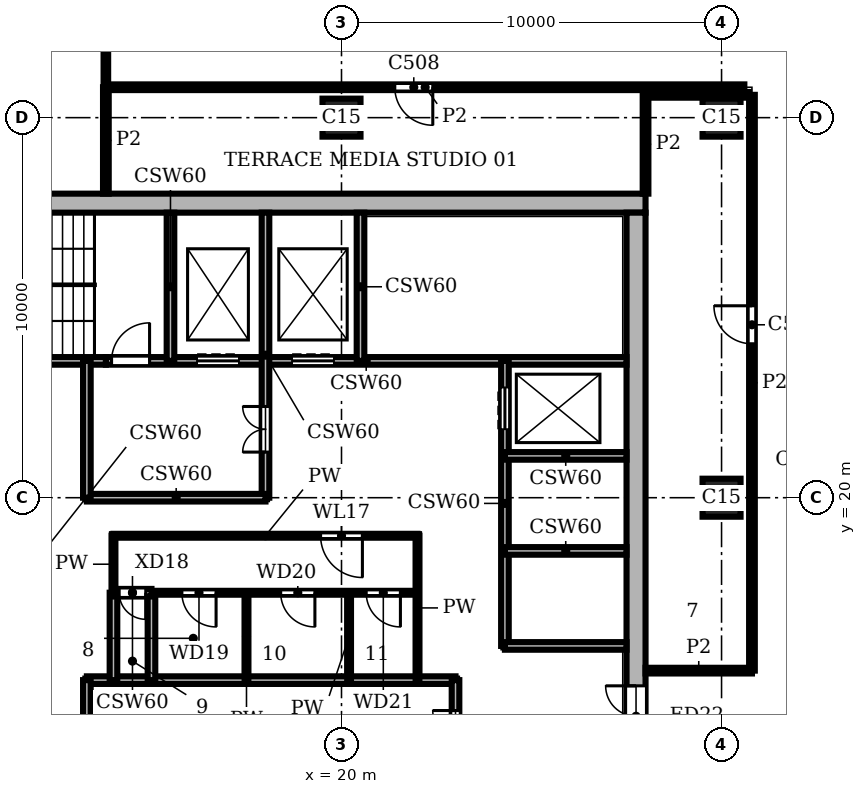
"""IFC4 building model, lengths in metres.
Left out: names, types, materials, properties, quantities, classifications, styles, units other than length and angle.
Written with IfcOpenShell. Run it as: python <this file> out.ifc"""

import sys

from ifc_helpers import new_model, si_unit, direction, frame, frame_2d, origin, origin_2d, place, context, subcontext, project, spatial, rectangle, extrude, element, fill, save


model = new_model("IFC4")
c1 = context("Model", 3, precision=1e-05, world=origin(), true_north=direction((0.0, 1.0)))
c2 = subcontext(c1, "Body", "Model", "MODEL_VIEW")
j1 = project(units=[si_unit("LENGTHUNIT", "METRE"), si_unit("PLANEANGLEUNIT", "RADIAN")], contexts=[c1])
p1 = place(None, origin())
s1 = spatial("IfcSite", under=j1, at=p1, CompositionType="ELEMENT")
p2 = place(p1, origin())
s2 = spatial("IfcBuilding", under=s1, at=p2, CompositionType="ELEMENT")
p3 = place(p2, frame((0.0, 0.0, 290.4)))
s3 = spatial("IfcBuildingStorey", under=s2, at=p3, CompositionType="ELEMENT", Elevation=290.4)
for number, where, z_axis, x_axis in (
    (1, (20.0, 30.0, 0.0), (0.0, 0.0, 1.0), (1.0, 0.0, 0.0)),
    (2, (30.0, 20.0, 0.0), (0.0, 0.0, 1.0), (1.0, 0.0, 0.0)),
    (3, (30.0, 30.0, 0.0), (0.0, 0.0, 1.0), (1.0, 0.0, 0.0)),
):
    element("IfcColumn", number, at=place(p3, frame(where, z_axis=z_axis, x_axis=x_axis)), inside=s3, PredefinedType="COLUMN", context=c2, shape_type="SweptSolid", body=[
        extrude(rectangle(XDim=1.0, YDim=1.0, at=origin_2d()), origin(), (0.0, 0.0, 1.0), 3.9),
    ])
p4 = place(p3, frame((27.75, 8.5, 0.0), z_axis=(0.0, 0.0, 1.0), x_axis=(0.0, 1.0, 0.0)))
e4 = element("IfcWall", 4, at=p4, inside=s3, PredefinedType="SHEAR", context=c2, shape_type="SweptSolid", body=[
    extrude(rectangle(XDim=19.0, YDim=0.5, at=frame_2d((9.5, 0.0))), origin(), (0.0, 0.0, 1.0), 3.9),
])
p5 = place(p4, frame((4.95, 0.0, 0.0)))
e5 = element("IfcOpeningElement", 5, at=p5, cuts=e4, PredefinedType="OPENING", context=c2, shape_type="SweptSolid", body=[
    extrude(rectangle(XDim=1.6, YDim=2.1, at=frame_2d((0.8, 1.05))), frame((0.0, 0.26, 0.0), z_axis=(0.0, -1.0, 0.0), x_axis=(1.0, 0.0, 0.0)), (0.0, 0.0, 1.0), 0.52),
])
p6 = place(p3, frame((28.0, 27.75, 0.0), z_axis=(0.0, 0.0, 1.0), x_axis=(-1.0, 0.0, 0.0)))
e6 = element("IfcWall", 6, at=p6, inside=s3, PredefinedType="SHEAR", context=c2, shape_type="SweptSolid", body=[
    extrude(rectangle(XDim=20.0, YDim=0.5, at=frame_2d((10.0, 0.0))), origin(), (0.0, 0.0, 1.0), 3.9),
])
p7 = place(p3, frame((13.3, 15.2, 0.0), z_axis=(0.0, 0.0, 1.0), x_axis=(1.0, 0.0, 0.0)))
e7 = element("IfcWall", 7, at=p7, inside=s3, PredefinedType="SHEAR", context=c2, shape_type="SweptSolid", body=[
    extrude(rectangle(XDim=9.7, YDim=0.2, at=frame_2d((4.85, 0.0))), origin(), (0.0, 0.0, 1.0), 3.58),
])
p8 = place(p3, frame((24.3, 16.1, 0.0), z_axis=(0.0, 0.0, 1.0), x_axis=(1.0, 0.0, 0.0)))
e8 = element("IfcWall", 8, at=p8, inside=s3, PredefinedType="SHEAR", context=c2, shape_type="SweptSolid", body=[
    extrude(rectangle(XDim=3.2, YDim=0.2, at=frame_2d((1.6, 0.0))), origin(), (0.0, 0.0, 1.0), 3.58),
])
p9 = place(p3, frame((15.0, 17.5, 0.0), z_axis=(0.0, 0.0, 1.0), x_axis=(1.0, 0.0, 0.0)))
e9 = element("IfcWall", 9, at=p9, inside=s3, PredefinedType="PARTITIONING", context=c2, shape_type="SweptSolid", body=[
    extrude(rectangle(XDim=7.0, YDim=0.1, at=frame_2d((3.5, 0.0))), origin(), (0.0, 0.0, 1.0), 3.58),
])
p10 = place(p9, frame((0.8, 0.0, 0.0)))
e10 = element("IfcOpeningElement", 10, at=p10, cuts=e9, PredefinedType="OPENING", context=c2, shape_type="SweptSolid", body=[
    extrude(rectangle(XDim=0.9, YDim=2.1, at=frame_2d((0.45, 1.05))), frame((0.0, 0.06, 0.0), z_axis=(0.0, -1.0, 0.0), x_axis=(1.0, 0.0, 0.0)), (0.0, 0.0, 1.0), 0.12),
])
p11 = place(p9, frame((3.4, 0.0, 0.0)))
e11 = element("IfcOpeningElement", 11, at=p11, cuts=e9, PredefinedType="OPENING", context=c2, shape_type="SweptSolid", body=[
    extrude(rectangle(XDim=0.9, YDim=2.1, at=frame_2d((0.45, 1.05))), frame((0.0, 0.06, 0.0), z_axis=(0.0, -1.0, 0.0), x_axis=(1.0, 0.0, 0.0)), (0.0, 0.0, 1.0), 0.12),
])
p12 = place(p9, frame((5.65, 0.0, 0.0)))
e12 = element("IfcOpeningElement", 12, at=p12, cuts=e9, PredefinedType="OPENING", context=c2, shape_type="SweptSolid", body=[
    extrude(rectangle(XDim=0.9, YDim=2.1, at=frame_2d((0.45, 1.05))), frame((0.0, 0.06, 0.0), z_axis=(0.0, -1.0, 0.0), x_axis=(1.0, 0.0, 0.0)), (0.0, 0.0, 1.0), 0.12),
])
p13 = place(p3, frame((14.0, 17.5, 0.0), z_axis=(0.0, 0.0, 1.0), x_axis=(1.0, 0.0, 0.0)))
e13 = element("IfcWall", 13, at=p13, inside=s3, PredefinedType="SHEAR", context=c2, shape_type="SweptSolid", body=[
    extrude(rectangle(XDim=1.0, YDim=0.2, at=frame_2d((0.5, 0.0))), origin(), (0.0, 0.0, 1.0), 3.58),
])
p14 = place(p13, frame((0.15, 0.0, 0.0)))
e14 = element("IfcOpeningElement", 14, at=p14, cuts=e13, PredefinedType="OPENING", context=c2, shape_type="SweptSolid", body=[
    extrude(rectangle(XDim=0.7, YDim=2.1, at=frame_2d((0.35, 1.05))), frame((0.0, 0.11, 0.0), z_axis=(0.0, -1.0, 0.0), x_axis=(1.0, 0.0, 0.0)), (0.0, 0.0, 1.0), 0.22),
])
p15 = place(p3, frame((24.3, 18.6, 0.0), z_axis=(0.0, 0.0, 1.0), x_axis=(1.0, 0.0, 0.0)))
e15 = element("IfcWall", 15, at=p15, inside=s3, PredefinedType="SHEAR", context=c2, shape_type="SweptSolid", body=[
    extrude(rectangle(XDim=3.2, YDim=0.2, at=frame_2d((1.6, 0.0))), origin(), (0.0, 0.0, 1.0), 3.58),
])
p16 = place(p3, frame((14.0, 19.0, 0.0), z_axis=(0.0, 0.0, 1.0), x_axis=(1.0, 0.0, 0.0)))
e16 = element("IfcWall", 16, at=p16, inside=s3, PredefinedType="PARTITIONING", context=c2, shape_type="SweptSolid", body=[
    extrude(rectangle(XDim=8.0, YDim=0.1, at=frame_2d((4.0, 0.0))), origin(), (0.0, 0.0, 1.0), 3.58),
])
p17 = place(p16, frame((5.45, 0.0, 0.0)))
e17 = element("IfcOpeningElement", 17, at=p17, cuts=e16, PredefinedType="OPENING", context=c2, shape_type="SweptSolid", body=[
    extrude(rectangle(XDim=1.1, YDim=2.1, at=frame_2d((0.55, 1.05))), frame((0.0, 0.06, 0.0), z_axis=(0.0, -1.0, 0.0), x_axis=(1.0, 0.0, 0.0)), (0.0, 0.0, 1.0), 0.12),
])
p18 = place(p3, frame((13.3, 20.0, 0.0), z_axis=(0.0, 0.0, 1.0), x_axis=(1.0, 0.0, 0.0)))
e18 = element("IfcWall", 18, at=p18, inside=s3, PredefinedType="SHEAR", context=c2, shape_type="SweptSolid", body=[
    extrude(rectangle(XDim=4.7, YDim=0.2, at=frame_2d((2.35, 0.0))), origin(), (0.0, 0.0, 1.0), 3.58),
])
p19 = place(p3, frame((24.3, 21.1, 0.0), z_axis=(0.0, 0.0, 1.0), x_axis=(1.0, 0.0, 0.0)))
e19 = element("IfcWall", 19, at=p19, inside=s3, PredefinedType="SHEAR", context=c2, shape_type="SweptSolid", body=[
    extrude(rectangle(XDim=3.2, YDim=0.2, at=frame_2d((1.6, 0.0))), origin(), (0.0, 0.0, 1.0), 3.58),
])
p20 = place(p3, frame((8.5, 23.6, 0.0), z_axis=(0.0, 0.0, 1.0), x_axis=(1.0, 0.0, 0.0)))
e20 = element("IfcWall", 20, at=p20, inside=s3, PredefinedType="SHEAR", context=c2, shape_type="SweptSolid", body=[
    extrude(rectangle(XDim=5.3, YDim=0.2, at=frame_2d((2.65, 0.0))), origin(), (0.0, 0.0, 1.0), 3.58),
])
p21 = place(p3, frame((13.8, 23.6, 0.0), z_axis=(0.0, 0.0, 1.0), x_axis=(1.0, 0.0, 0.0)))
e21 = element("IfcWall", 21, at=p21, inside=s3, PredefinedType="SHEAR", context=c2, shape_type="SweptSolid", body=[
    extrude(rectangle(XDim=13.7, YDim=0.2, at=frame_2d((6.85, 0.0))), origin(), (0.0, 0.0, 1.0), 3.58),
])
p22 = place(p21, frame((2.4, 0.0, 0.0)))
e22 = element("IfcOpeningElement", 22, at=p22, cuts=e21, PredefinedType="OPENING", context=c2, shape_type="SweptSolid", body=[
    extrude(rectangle(XDim=1.1, YDim=2.1, at=frame_2d((0.55, 1.05))), frame((0.0, 0.11, 0.0), z_axis=(0.0, -1.0, 0.0), x_axis=(1.0, 0.0, 0.0)), (0.0, 0.0, 1.0), 0.22),
])
p23 = place(p21, frame((4.9, 0.0, 0.0)))
e23 = element("IfcOpeningElement", 23, at=p23, cuts=e21, PredefinedType="OPENING", context=c2, shape_type="SweptSolid", body=[
    extrude(rectangle(XDim=1.1, YDim=2.1, at=frame_2d((0.55, 1.05))), frame((0.0, 0.11, 0.0), z_axis=(0.0, -1.0, 0.0), x_axis=(1.0, 0.0, 0.0)), (0.0, 0.0, 1.0), 0.22),
])
p24 = place(p21, frame((0.15, 0.0, 0.0)))
e24 = element("IfcOpeningElement", 24, at=p24, cuts=e21, PredefinedType="OPENING", context=c2, shape_type="SweptSolid", body=[
    extrude(rectangle(XDim=1.0, YDim=2.1, at=frame_2d((0.5, 1.05))), frame((0.0, 0.11, 0.0), z_axis=(0.0, -1.0, 0.0), x_axis=(1.0, 0.0, 0.0)), (0.0, 0.0, 1.0), 0.22),
])
p25 = place(p3, frame((13.3, 12.4, 0.0), z_axis=(0.0, 0.0, 1.0), x_axis=(0.0, 1.0, 0.0)))
e25 = element("IfcWall", 25, at=p25, inside=s3, PredefinedType="SHEAR", context=c2, shape_type="SweptSolid", body=[
    extrude(rectangle(XDim=2.8, YDim=0.2, at=frame_2d((1.4, 0.0))), origin(), (0.0, 0.0, 1.0), 3.58),
])
p26 = place(p3, frame((13.3, 20.0, 0.0), z_axis=(0.0, 0.0, 1.0), x_axis=(0.0, 1.0, 0.0)))
e26 = element("IfcWall", 26, at=p26, inside=s3, PredefinedType="SHEAR", context=c2, shape_type="SweptSolid", body=[
    extrude(rectangle(XDim=3.6, YDim=0.2, at=frame_2d((1.8, 0.0))), origin(), (0.0, 0.0, 1.0), 3.58),
])
p27 = place(p3, frame((14.0, 17.5, 0.0), z_axis=(0.0, 0.0, 1.0), x_axis=(0.0, 1.0, 0.0)))
e27 = element("IfcWall", 27, at=p27, inside=s3, PredefinedType="PARTITIONING", context=c2, shape_type="SweptSolid", body=[
    extrude(rectangle(XDim=1.5, YDim=0.1, at=frame_2d((0.75, 0.0))), origin(), (0.0, 0.0, 1.0), 3.58),
])
for number, where, z_axis, x_axis in (
    (28, (14.0, 15.2, 0.0), (0.0, 0.0, 1.0), (0.0, 1.0, 0.0)),
    (29, (15.0, 15.2, 0.0), (0.0, 0.0, 1.0), (0.0, 1.0, 0.0)),
):
    element("IfcWall", number, at=place(p3, frame(where, z_axis=z_axis, x_axis=x_axis)), inside=s3, PredefinedType="SHEAR", context=c2, shape_type="SweptSolid", body=[
        extrude(rectangle(XDim=2.3, YDim=0.2, at=frame_2d((1.15, 0.0))), origin(), (0.0, 0.0, 1.0), 3.58),
    ])
p28 = place(p3, frame((15.5, 23.6, 0.0), z_axis=(0.0, 0.0, 1.0), x_axis=(0.0, 1.0, 0.0)))
e30 = element("IfcWall", 30, at=p28, inside=s3, PredefinedType="SHEAR", context=c2, shape_type="SweptSolid", body=[
    extrude(rectangle(XDim=3.9, YDim=0.2, at=frame_2d((1.95, 0.0))), origin(), (0.0, 0.0, 1.0), 3.58),
])
p29 = place(p3, frame((17.5, 15.2, 0.0), z_axis=(0.0, 0.0, 1.0), x_axis=(0.0, 1.0, 0.0)))
e31 = element("IfcWall", 31, at=p29, inside=s3, PredefinedType="PARTITIONING", context=c2, shape_type="SweptSolid", body=[
    extrude(rectangle(XDim=2.3, YDim=0.1, at=frame_2d((1.15, 0.0))), origin(), (0.0, 0.0, 1.0), 3.58),
])
p30 = place(p3, frame((18.0, 20.0, 0.0), z_axis=(0.0, 0.0, 1.0), x_axis=(0.0, 1.0, 0.0)))
e32 = element("IfcWall", 32, at=p30, inside=s3, PredefinedType="SHEAR", context=c2, shape_type="SweptSolid", body=[
    extrude(rectangle(XDim=7.5, YDim=0.2, at=frame_2d((3.75, 0.0))), origin(), (0.0, 0.0, 1.0), 3.58),
])
p31 = place(p30, frame((1.2, 0.0, 0.0)))
e33 = element("IfcOpeningElement", 33, at=p31, cuts=e32, PredefinedType="OPENING", context=c2, shape_type="SweptSolid", body=[
    extrude(rectangle(XDim=1.2, YDim=2.1, at=frame_2d((0.6, 1.05))), frame((0.0, 0.11, 0.0), z_axis=(0.0, -1.0, 0.0), x_axis=(1.0, 0.0, 0.0)), (0.0, 0.0, 1.0), 0.22),
])
p32 = place(p3, frame((20.2, 15.2, 0.0), z_axis=(0.0, 0.0, 1.0), x_axis=(0.0, 1.0, 0.0)))
e34 = element("IfcWall", 34, at=p32, inside=s3, PredefinedType="PARTITIONING", context=c2, shape_type="SweptSolid", body=[
    extrude(rectangle(XDim=2.3, YDim=0.1, at=frame_2d((1.15, 0.0))), origin(), (0.0, 0.0, 1.0), 3.58),
])
p33 = place(p3, frame((20.5, 23.6, 0.0), z_axis=(0.0, 0.0, 1.0), x_axis=(0.0, 1.0, 0.0)))
e35 = element("IfcWall", 35, at=p33, inside=s3, PredefinedType="SHEAR", context=c2, shape_type="SweptSolid", body=[
    extrude(rectangle(XDim=3.9, YDim=0.2, at=frame_2d((1.95, 0.0))), origin(), (0.0, 0.0, 1.0), 3.58),
])
p34 = place(p3, frame((22.0, 15.2, 0.0), z_axis=(0.0, 0.0, 1.0), x_axis=(0.0, 1.0, 0.0)))
e36 = element("IfcWall", 36, at=p34, inside=s3, PredefinedType="PARTITIONING", context=c2, shape_type="SweptSolid", body=[
    extrude(rectangle(XDim=3.8, YDim=0.1, at=frame_2d((1.9, 0.0))), origin(), (0.0, 0.0, 1.0), 3.58),
])
p35 = place(p3, frame((23.0, 12.4, 0.0), z_axis=(0.0, 0.0, 1.0), x_axis=(0.0, 1.0, 0.0)))
e37 = element("IfcWall", 37, at=p35, inside=s3, PredefinedType="SHEAR", context=c2, shape_type="SweptSolid", body=[
    extrude(rectangle(XDim=2.8, YDim=0.2, at=frame_2d((1.4, 0.0))), origin(), (0.0, 0.0, 1.0), 3.58),
])
p36 = place(p35, frame((0.8, 0.0, 0.0)))
e38 = element("IfcOpeningElement", 38, at=p36, cuts=e37, PredefinedType="OPENING", context=c2, shape_type="SweptSolid", body=[
    extrude(rectangle(XDim=1.2, YDim=2.1, at=frame_2d((0.6, 1.05))), frame((0.0, 0.11, 0.0), z_axis=(0.0, -1.0, 0.0), x_axis=(1.0, 0.0, 0.0)), (0.0, 0.0, 1.0), 0.22),
])
p37 = place(p3, frame((24.3, 16.1, 0.0), z_axis=(0.0, 0.0, 1.0), x_axis=(0.0, 1.0, 0.0)))
e39 = element("IfcWall", 39, at=p37, inside=s3, PredefinedType="SHEAR", context=c2, shape_type="SweptSolid", body=[
    extrude(rectangle(XDim=7.5, YDim=0.2, at=frame_2d((3.75, 0.0))), origin(), (0.0, 0.0, 1.0), 3.58),
])
p38 = place(p37, frame((5.7, 0.0, 0.0)))
e40 = element("IfcOpeningElement", 40, at=p38, cuts=e39, PredefinedType="OPENING", context=c2, shape_type="SweptSolid", body=[
    extrude(rectangle(XDim=1.1, YDim=2.1, at=frame_2d((0.55, 1.05))), frame((0.0, 0.11, 0.0), z_axis=(0.0, -1.0, 0.0), x_axis=(1.0, 0.0, 0.0)), (0.0, 0.0, 1.0), 0.22),
])
p39 = place(p3, frame((13.8, 28.0, 0.0), z_axis=(0.0, 0.0, 1.0), x_axis=(0.0, 1.0, 0.0)))
e41 = element("IfcWall", 41, at=p39, inside=s3, PredefinedType="PARTITIONING", context=c2, shape_type="SweptSolid", body=[
    extrude(rectangle(XDim=2.801, YDim=0.15, at=frame_2d((1.4, 0.0))), origin(), (0.0, 0.0, 1.0), 3.58),
])
p40 = place(p3, frame((28.0, 28.0, 0.0), z_axis=(0.0, 0.0, 1.0), x_axis=(0.0, 1.0, 0.0)))
e42 = element("IfcWall", 42, at=p40, inside=s3, PredefinedType="PARTITIONING", context=c2, shape_type="SweptSolid", body=[
    extrude(rectangle(XDim=2.598, YDim=0.15, at=frame_2d((1.299, 0.0))), origin(), (0.0, 0.0, 1.0), 3.58),
])
p41 = place(p3, frame((30.8, 15.45, 0.0), z_axis=(0.0, 0.0, 1.0), x_axis=(0.0, 1.0, 0.0)))
e43 = element("IfcWall", 43, at=p41, inside=s3, PredefinedType="PARTITIONING", context=c2, shape_type="SweptSolid", body=[
    extrude(rectangle(XDim=15.15, YDim=0.15, at=frame_2d((7.575, 0.0))), origin(), (0.0, 0.0, 1.0), 3.58),
])
p42 = place(p41, frame((8.6, 0.0, 0.0)))
e44 = element("IfcOpeningElement", 44, at=p42, cuts=e43, PredefinedType="OPENING", context=c2, shape_type="SweptSolid", body=[
    extrude(rectangle(XDim=1.0, YDim=2.1, at=frame_2d((0.5, 1.05))), frame((0.0, 0.085, 0.0), z_axis=(0.0, -1.0, 0.0), x_axis=(1.0, 0.0, 0.0)), (0.0, 0.0, 1.0), 0.17),
])
p43 = place(p3, frame((28.0, 15.45, 0.0), z_axis=(0.0, 0.0, 1.0), x_axis=(1.0, 0.0, 0.0)))
e45 = element("IfcWall", 45, at=p43, inside=s3, PredefinedType="PARTITIONING", context=c2, shape_type="SweptSolid", body=[
    extrude(rectangle(XDim=2.8, YDim=0.15, at=frame_2d((1.4, 0.0))), origin(), (0.0, 0.0, 1.0), 3.58),
])
p44 = place(p3, frame((28.002, 30.6, 0.0), z_axis=(0.0, 0.0, 1.0), x_axis=(1.0, 0.0, 0.0)))
e46 = element("IfcWall", 46, at=p44, inside=s3, PredefinedType="PARTITIONING", context=c2, shape_type="SweptSolid", body=[
    extrude(rectangle(XDim=2.723, YDim=0.15, at=frame_2d((1.362, 0.0))), origin(), (0.0, 0.0, 1.0), 3.58),
])
p45 = place(p3, frame((13.802, 30.8, 0.0), z_axis=(0.0, 0.0, 1.0), x_axis=(1.0, 0.0, 0.0)))
e47 = element("IfcWall", 47, at=p45, inside=s3, PredefinedType="PARTITIONING", context=c2, shape_type="SweptSolid", body=[
    extrude(rectangle(XDim=16.798, YDim=0.15, at=frame_2d((8.399, 0.0))), origin(), (0.0, 0.0, 1.0), 3.58),
])
p46 = place(p45, frame((7.6, 0.0, 0.0)))
e48 = element("IfcOpeningElement", 48, at=p46, cuts=e47, PredefinedType="OPENING", context=c2, shape_type="SweptSolid", body=[
    extrude(rectangle(XDim=1.0, YDim=2.1, at=frame_2d((0.5, 1.05))), frame((0.0, 0.085, 0.0), z_axis=(0.0, -1.0, 0.0), x_axis=(1.0, 0.0, 0.0)), (0.0, 0.0, 1.0), 0.17),
])
p47 = place(p3, frame((13.8, 30.8, 0.0), z_axis=(0.0, 0.0, 1.0), x_axis=(0.0, 1.0, 0.0)))
e49 = element("IfcWall", 49, at=p47, inside=s3, PredefinedType="PARTITIONING", context=c2, shape_type="SweptSolid", body=[
    extrude(rectangle(XDim=26.8, YDim=0.12, at=frame_2d((13.4, 0.0))), origin(), (0.0, 0.0, 1.0), 3.58),
])
p48 = place(p47, frame((12.1, 0.0, 0.0)))
e50 = element("IfcOpeningElement", 50, at=p48, cuts=e49, PredefinedType="OPENING", context=c2, shape_type="SweptSolid", body=[
    extrude(rectangle(XDim=1.8, YDim=2.1, at=frame_2d((0.9, 1.05))), frame((0.0, 0.07, 0.0), z_axis=(0.0, -1.0, 0.0), x_axis=(1.0, 0.0, 0.0)), (0.0, 0.0, 1.0), 0.14),
])
p49 = place(p38, origin())
e51 = element("IfcDoor", 51, at=p49, inside=s3, OperationType="DOUBLE_DOOR_SLIDING", PredefinedType="DOOR", context=c2, shape_type="SweptSolid", body=[
    extrude(rectangle(XDim=1.1, YDim=2.1, at=frame_2d((0.55, 1.05))), frame((0.0, 0.025, 0.0), z_axis=(0.0, -1.0, 0.0), x_axis=(1.0, 0.0, 0.0)), (0.0, 0.0, 1.0), 0.05),
])
fill(e40, e51)
p50 = place(p22, origin())
e52 = element("IfcDoor", 52, at=p50, inside=s3, OperationType="DOUBLE_DOOR_SLIDING", PredefinedType="DOOR", context=c2, shape_type="SweptSolid", body=[
    extrude(rectangle(XDim=1.1, YDim=2.1, at=frame_2d((0.55, 1.05))), frame((0.0, 0.025, 0.0), z_axis=(0.0, -1.0, 0.0), x_axis=(1.0, 0.0, 0.0)), (0.0, 0.0, 1.0), 0.05),
])
fill(e22, e52)
p51 = place(p23, origin())
e53 = element("IfcDoor", 53, at=p51, inside=s3, OperationType="DOUBLE_DOOR_SLIDING", PredefinedType="DOOR", context=c2, shape_type="SweptSolid", body=[
    extrude(rectangle(XDim=1.1, YDim=2.1, at=frame_2d((0.55, 1.05))), frame((0.0, 0.025, 0.0), z_axis=(0.0, -1.0, 0.0), x_axis=(1.0, 0.0, 0.0)), (0.0, 0.0, 1.0), 0.05),
])
fill(e23, e53)
p52 = place(p24, origin())
e54 = element("IfcDoor", 54, at=p52, inside=s3, OperationType="SINGLE_SWING_RIGHT", PredefinedType="DOOR", context=c2, shape_type="SweptSolid", body=[
    extrude(rectangle(XDim=1.0, YDim=2.1, at=frame_2d((0.5, 1.05))), frame((0.0, 0.025, 0.0), z_axis=(0.0, -1.0, 0.0), x_axis=(1.0, 0.0, 0.0)), (0.0, 0.0, 1.0), 0.05),
])
fill(e24, e54)
p53 = place(p36, origin())
e55 = element("IfcDoor", 55, at=p53, inside=s3, OperationType="DOUBLE_DOOR_SINGLE_SWING", PredefinedType="DOOR", context=c2, shape_type="SweptSolid", body=[
    extrude(rectangle(XDim=1.2, YDim=2.1, at=frame_2d((0.6, 1.05))), frame((0.0, 0.025, 0.0), z_axis=(0.0, -1.0, 0.0), x_axis=(1.0, 0.0, 0.0)), (0.0, 0.0, 1.0), 0.05),
])
fill(e38, e55)
p54 = place(p31, origin())
e56 = element("IfcDoor", 56, at=p54, inside=s3, OperationType="DOUBLE_DOOR_SINGLE_SWING", PredefinedType="DOOR", context=c2, shape_type="SweptSolid", body=[
    extrude(rectangle(XDim=1.2, YDim=2.1, at=frame_2d((0.6, 1.05))), frame((0.0, 0.025, 0.0), z_axis=(0.0, -1.0, 0.0), x_axis=(1.0, 0.0, 0.0)), (0.0, 0.0, 1.0), 0.05),
])
fill(e33, e56)
p55 = place(p17, frame((1.1, 0.0, 0.0), z_axis=(0.0, 0.0, 1.0), x_axis=(-1.0, 0.0, 0.0)))
e57 = element("IfcDoor", 57, at=p55, inside=s3, OperationType="SINGLE_SWING_LEFT", PredefinedType="DOOR", context=c2, shape_type="SweptSolid", body=[
    extrude(rectangle(XDim=1.1, YDim=2.1, at=frame_2d((0.55, 1.05))), frame((0.0, 0.025, 0.0), z_axis=(0.0, -1.0, 0.0), x_axis=(1.0, 0.0, 0.0)), (0.0, 0.0, 1.0), 0.05),
])
fill(e17, e57)
p56 = place(p14, frame((0.7, 0.0, 0.0), z_axis=(0.0, 0.0, 1.0), x_axis=(-1.0, 0.0, 0.0)))
e58 = element("IfcDoor", 58, at=p56, inside=s3, OperationType="SINGLE_SWING_LEFT", PredefinedType="DOOR", context=c2, shape_type="SweptSolid", body=[
    extrude(rectangle(XDim=0.7, YDim=2.1, at=frame_2d((0.35, 1.05))), frame((0.0, 0.025, 0.0), z_axis=(0.0, -1.0, 0.0), x_axis=(1.0, 0.0, 0.0)), (0.0, 0.0, 1.0), 0.05),
])
fill(e14, e58)
p57 = place(p10, frame((0.9, 0.0, 0.0), z_axis=(0.0, 0.0, 1.0), x_axis=(-1.0, 0.0, 0.0)))
e59 = element("IfcDoor", 59, at=p57, inside=s3, OperationType="SINGLE_SWING_LEFT", PredefinedType="DOOR", context=c2, shape_type="SweptSolid", body=[
    extrude(rectangle(XDim=0.9, YDim=2.1, at=frame_2d((0.45, 1.05))), frame((0.0, 0.025, 0.0), z_axis=(0.0, -1.0, 0.0), x_axis=(1.0, 0.0, 0.0)), (0.0, 0.0, 1.0), 0.05),
])
fill(e10, e59)
p58 = place(p11, frame((0.9, 0.0, 0.0), z_axis=(0.0, 0.0, 1.0), x_axis=(-1.0, 0.0, 0.0)))
e60 = element("IfcDoor", 60, at=p58, inside=s3, OperationType="SINGLE_SWING_LEFT", PredefinedType="DOOR", context=c2, shape_type="SweptSolid", body=[
    extrude(rectangle(XDim=0.9, YDim=2.1, at=frame_2d((0.45, 1.05))), frame((0.0, 0.025, 0.0), z_axis=(0.0, -1.0, 0.0), x_axis=(1.0, 0.0, 0.0)), (0.0, 0.0, 1.0), 0.05),
])
fill(e11, e60)
p59 = place(p12, frame((0.9, 0.0, 0.0), z_axis=(0.0, 0.0, 1.0), x_axis=(-1.0, 0.0, 0.0)))
e61 = element("IfcDoor", 61, at=p59, inside=s3, OperationType="SINGLE_SWING_LEFT", PredefinedType="DOOR", context=c2, shape_type="SweptSolid", body=[
    extrude(rectangle(XDim=0.9, YDim=2.1, at=frame_2d((0.45, 1.05))), frame((0.0, 0.025, 0.0), z_axis=(0.0, -1.0, 0.0), x_axis=(1.0, 0.0, 0.0)), (0.0, 0.0, 1.0), 0.05),
])
fill(e12, e61)
p60 = place(p5, origin())
e62 = element("IfcDoor", 62, at=p60, inside=s3, OperationType="DOUBLE_DOOR_SINGLE_SWING", PredefinedType="DOOR", context=c2, shape_type="SweptSolid", body=[
    extrude(rectangle(XDim=1.6, YDim=2.1, at=frame_2d((0.8, 1.05))), frame((0.0, 0.025, 0.0), z_axis=(0.0, -1.0, 0.0), x_axis=(1.0, 0.0, 0.0)), (0.0, 0.0, 1.0), 0.05),
])
fill(e5, e62)
p61 = place(p46, frame((1.0, 0.0, 0.0), z_axis=(0.0, 0.0, 1.0), x_axis=(-1.0, 0.0, 0.0)))
e63 = element("IfcDoor", 63, at=p61, inside=s3, OperationType="SINGLE_SWING_LEFT", PredefinedType="DOOR", context=c2, shape_type="SweptSolid", body=[
    extrude(rectangle(XDim=1.0, YDim=2.1, at=frame_2d((0.5, 1.05))), frame((0.0, 0.025, 0.0), z_axis=(0.0, -1.0, 0.0), x_axis=(1.0, 0.0, 0.0)), (0.0, 0.0, 1.0), 0.05),
])
fill(e48, e63)
p62 = place(p42, origin())
e64 = element("IfcDoor", 64, at=p62, inside=s3, OperationType="SINGLE_SWING_RIGHT", PredefinedType="DOOR", context=c2, shape_type="SweptSolid", body=[
    extrude(rectangle(XDim=1.0, YDim=2.1, at=frame_2d((0.5, 1.05))), frame((0.0, 0.025, 0.0), z_axis=(0.0, -1.0, 0.0), x_axis=(1.0, 0.0, 0.0)), (0.0, 0.0, 1.0), 0.05),
])
fill(e44, e64)
save(model, sys.argv[1])
